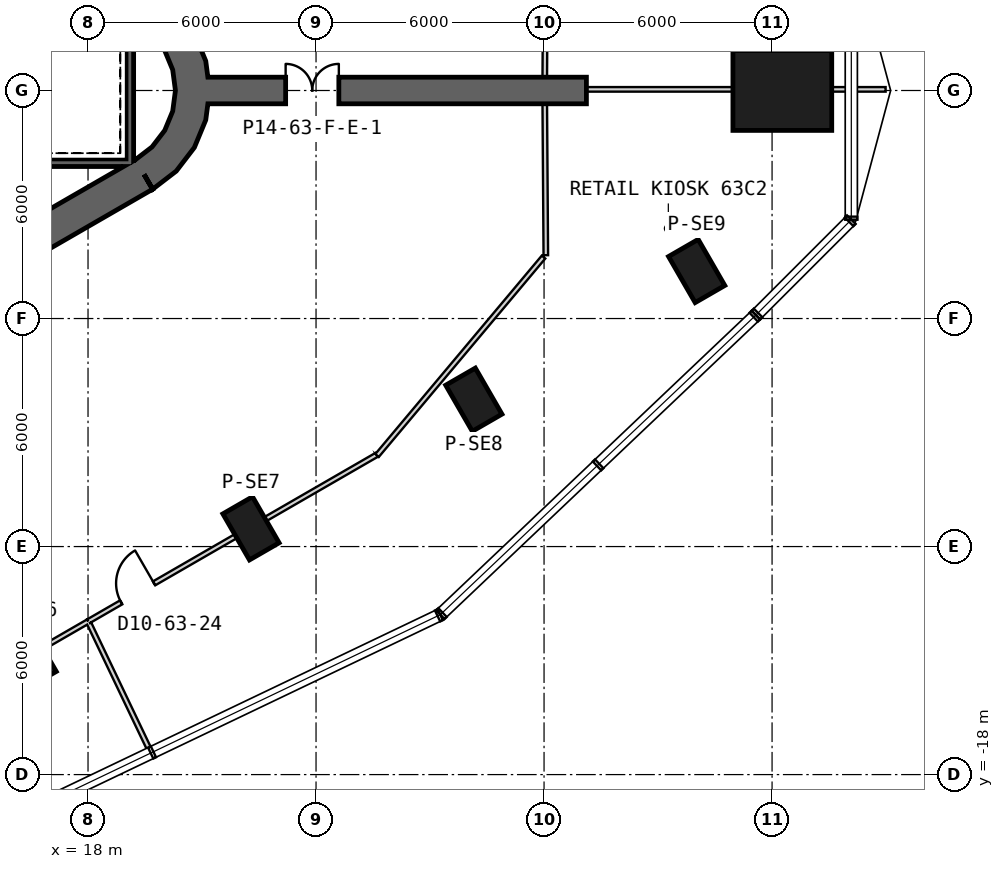
"""IFC4 building model, lengths in metres.
Left out: names, types, materials, properties, quantities, classifications, styles, units other than length and angle.
Written with IfcOpenShell. Run it as: python <this file> out.ifc"""

import sys

from ifc_helpers import new_model, si_unit, direction, frame, frame_2d, origin, origin_2d, place, context, subcontext, project, spatial, polyline, rectangle, outline, extrude, element, fill, save


model = new_model("IFC4")
c1 = context("Model", 3, precision=1e-05, world=origin(), true_north=direction((0.0, 1.0)))
c2 = subcontext(c1, "Body", "Model", "MODEL_VIEW")
j1 = project(units=[si_unit("LENGTHUNIT", "METRE"), si_unit("PLANEANGLEUNIT", "RADIAN")], contexts=[c1])
p1 = place(None, origin())
s1 = spatial("IfcSite", under=j1, at=p1, CompositionType="ELEMENT")
p2 = place(p1, origin())
s2 = spatial("IfcBuilding", under=s1, at=p2, CompositionType="ELEMENT")
p3 = place(p2, frame((0.0, 0.0, 277.2)))
s3 = spatial("IfcBuildingStorey", under=s2, at=p3, CompositionType="ELEMENT", Elevation=277.2)
p4 = place(p3, frame((36.27, 0.0, 0.0), z_axis=(0.0, 0.0, 1.0), x_axis=(1.0, 0.0, 0.0)))
e1 = element("IfcColumn", 1, at=p4, inside=s3, PredefinedType="COLUMN", context=c2, shape_type="SweptSolid", body=[
    extrude(rectangle(XDim=2.6, YDim=2.1, at=origin_2d()), origin(), (0.0, 0.0, 1.0), 6.5),
])
for number, where, z_axis, x_axis in (
    (2, (16.425, -14.906, 0.0), (0.0, 0.0, 1.0), (0.5, -0.866, 0.0)),
    (3, (22.288, -11.521, 0.0), (0.0, 0.0, 1.0), (0.5, -0.866, 0.0)),
    (4, (28.152, -8.135, 0.0), (0.0, 0.0, 1.0), (0.5, -0.866, 0.0)),
    (5, (34.016, -4.75, 0.0), (0.0, 0.0, 1.0), (0.5, -0.866, 0.0)),
):
    element("IfcColumn", number, at=place(p3, frame(where, z_axis=z_axis, x_axis=x_axis)), inside=s3, PredefinedType="COLUMN", context=c2, shape_type="SweptSolid", body=[
        extrude(rectangle(XDim=1.4, YDim=0.9, at=origin_2d()), origin(), (0.0, 0.0, 1.0), 6.5),
    ])
p5 = place(p3, frame((-7.825, -17.97, 0.0), z_axis=(0.0, 0.0, 1.0), x_axis=(0.866028369851, 0.499994862586, 0.0)))
e6 = element("IfcWall", 6, at=p5, inside=s3, PredefinedType="SHEAR", context=c2, shape_type="SweptSolid", body=[
    extrude(rectangle(XDim=31.523, YDim=0.9, at=frame_2d((15.762, 0.0))), origin(), (0.0, 0.0, 1.0), 6.5),
])
p6 = place(p5, frame((7.062, 0.0, 0.0)))
e7 = element("IfcOpeningElement", 7, at=p6, cuts=e6, PredefinedType="OPENING", context=c2, shape_type="SweptSolid", body=[
    extrude(rectangle(XDim=1.2, YDim=2.4, at=frame_2d((0.6, 1.2))), frame((0.0, 0.46, 0.0), z_axis=(0.0, -1.0, 0.0), x_axis=(1.0, 0.0, 0.0)), (0.0, 0.0, 1.0), 0.92),
])
p7 = place(p5, frame((9.762, 0.0, 0.0)))
e8 = element("IfcOpeningElement", 8, at=p7, cuts=e6, PredefinedType="OPENING", context=c2, shape_type="SweptSolid", body=[
    extrude(rectangle(XDim=1.2, YDim=2.4, at=frame_2d((0.6, 1.2))), frame((0.0, 0.46, 0.0), z_axis=(0.0, -1.0, 0.0), x_axis=(1.0, 0.0, 0.0)), (0.0, 0.0, 1.0), 0.92),
])
p8 = place(p5, frame((12.462, 0.0, 0.0)))
e9 = element("IfcOpeningElement", 9, at=p8, cuts=e6, PredefinedType="OPENING", context=c2, shape_type="SweptSolid", body=[
    extrude(rectangle(XDim=1.2, YDim=2.4, at=frame_2d((0.6, 1.2))), frame((0.0, 0.46, 0.0), z_axis=(0.0, -1.0, 0.0), x_axis=(1.0, 0.0, 0.0)), (0.0, 0.0, 1.0), 0.92),
])
p9 = place(p5, frame((15.162, 0.0, 0.0)))
e10 = element("IfcOpeningElement", 10, at=p9, cuts=e6, PredefinedType="OPENING", context=c2, shape_type="SweptSolid", body=[
    extrude(rectangle(XDim=1.2, YDim=2.4, at=frame_2d((0.6, 1.2))), frame((0.0, 0.46, 0.0), z_axis=(0.0, -1.0, 0.0), x_axis=(1.0, 0.0, 0.0)), (0.0, 0.0, 1.0), 0.92),
])
p10 = place(p5, frame((17.862, 0.0, 0.0)))
e11 = element("IfcOpeningElement", 11, at=p10, cuts=e6, PredefinedType="OPENING", context=c2, shape_type="SweptSolid", body=[
    extrude(rectangle(XDim=1.2, YDim=2.4, at=frame_2d((0.6, 1.2))), frame((0.0, 0.46, 0.0), z_axis=(0.0, -1.0, 0.0), x_axis=(1.0, 0.0, 0.0)), (0.0, 0.0, 1.0), 0.92),
])
p11 = place(p5, frame((20.562, 0.0, 0.0)))
e12 = element("IfcOpeningElement", 12, at=p11, cuts=e6, PredefinedType="OPENING", context=c2, shape_type="SweptSolid", body=[
    extrude(rectangle(XDim=1.2, YDim=2.4, at=frame_2d((0.6, 1.2))), frame((0.0, 0.46, 0.0), z_axis=(0.0, -1.0, 0.0), x_axis=(1.0, 0.0, 0.0)), (0.0, 0.0, 1.0), 0.92),
])
p12 = place(p5, frame((26.712, 0.0, 0.0)))
e13 = element("IfcOpeningElement", 13, at=p12, cuts=e6, PredefinedType="OPENING", context=c2, shape_type="SweptSolid", body=[
    extrude(rectangle(XDim=1.2, YDim=2.4, at=frame_2d((0.6, 1.2))), frame((0.0, 0.46, 0.0), z_axis=(0.0, -1.0, 0.0), x_axis=(1.0, 0.0, 0.0)), (0.0, 0.0, 1.0), 0.92),
])
p13 = place(p5, frame((3.612, 0.0, 0.0)))
e14 = element("IfcOpeningElement", 14, at=p13, cuts=e6, PredefinedType="OPENING", context=c2, shape_type="SweptSolid", body=[
    extrude(rectangle(XDim=1.2, YDim=2.4, at=frame_2d((0.6, 1.2))), frame((0.0, 0.46, 0.0), z_axis=(0.0, -1.0, 0.0), x_axis=(1.0, 0.0, 0.0)), (0.0, 0.0, 1.0), 0.92),
])
p14 = place(p3, origin())
e15 = element("IfcWall", 15, at=p14, inside=s3, PredefinedType="SHEAR", context=c2, shape_type="SweptSolid", body=[
    extrude(outline(polyline([(19.7, -2.598), (20.321, -2.121), (20.798, -1.5), (21.098, -0.777), (21.2, 0.0), (21.098, 0.777), (20.798, 1.5), (20.321, 2.121), (19.7, 2.598), (19.25, 1.819), (19.685, 1.485), (20.019, 1.05), (20.229, 0.543), (20.3, 0.0), (20.229, -0.543), (20.019, -1.05), (19.685, -1.485), (19.25, -1.819), (19.7, -2.598)])), origin(), (0.0, 0.0, 1.0), 6.5),
])
p15 = place(p3, frame((21.15, 0.0, 0.0), z_axis=(0.0, 0.0, 1.0), x_axis=(1.0, 0.0, 0.0)))
e16 = element("IfcWall", 16, at=p15, inside=s3, PredefinedType="SHEAR", context=c2, shape_type="SweptSolid", body=[
    extrude(rectangle(XDim=9.965, YDim=0.7, at=frame_2d((4.982, 0.0))), origin(), (0.0, 0.0, 1.0), 6.5),
])
p16 = place(p15, frame((2.05, 0.0, 0.0)))
e17 = element("IfcOpeningElement", 17, at=p16, cuts=e16, PredefinedType="OPENING", context=c2, shape_type="SweptSolid", body=[
    extrude(rectangle(XDim=1.4, YDim=2.4, at=frame_2d((0.7, 1.2))), frame((0.0, 0.36, 0.0), z_axis=(0.0, -1.0, 0.0), x_axis=(1.0, 0.0, 0.0)), (0.0, 0.0, 1.0), 0.72),
])
p17 = place(p3, frame((19.1, -2.0, -0.35), z_axis=(0.0, 0.0, 1.0), x_axis=(0.0, 1.0, 0.0)))
e18 = element("IfcWall", 18, at=p17, inside=s3, PredefinedType="SHEAR", context=c2, shape_type="SweptSolid", body=[
    extrude(rectangle(XDim=3.8, YDim=0.2, at=frame_2d((1.9, 0.0))), origin(), (0.0, 0.0, 1.0), 6.45),
])
p18 = place(p3, frame((11.1, -1.9, -0.35), z_axis=(0.0, 0.0, 1.0), x_axis=(1.0, 0.0, 0.0)))
e19 = element("IfcWall", 19, at=p18, inside=s3, PredefinedType="SHEAR", context=c2, shape_type="SweptSolid", body=[
    extrude(rectangle(XDim=7.9, YDim=0.2, at=frame_2d((3.95, 0.0))), origin(), (0.0, 0.0, 1.0), 6.45),
])
p19 = place(p3, frame((30.019, 0.35, 0.0), z_axis=(0.0, 0.0, 1.0), x_axis=(0.00700430852, 0.99997546953, 0.0)))
e20 = element("IfcWall", 20, at=p19, inside=s3, PredefinedType="PARTITIONING", context=c2, shape_type="SweptSolid", body=[
    extrude(rectangle(XDim=3.869, YDim=0.12, at=frame_2d((1.935, 0.0))), origin(), (0.0, 0.0, 1.0), 5.28),
])
p20 = place(p3, frame((31.115, 0.03, 0.0), z_axis=(0.0, 0.0, 1.0), x_axis=(1.0, 0.0, 0.0)))
e21 = element("IfcWall", 21, at=p20, inside=s3, PredefinedType="PARTITIONING", context=c2, shape_type="SweptSolid", body=[
    extrude(rectangle(XDim=3.856, YDim=0.12, at=frame_2d((1.928, 0.0))), origin(), (0.0, 0.0, 1.0), 5.67),
])
p21 = place(p3, frame((37.57, 0.03, 0.0), z_axis=(0.0, 0.0, 1.0), x_axis=(1.0, 0.0, 0.0)))
e22 = element("IfcWall", 22, at=p21, inside=s3, PredefinedType="PARTITIONING", context=c2, shape_type="SweptSolid", body=[
    extrude(rectangle(XDim=1.418, YDim=0.12, at=frame_2d((0.709, 0.0))), origin(), (0.0, 0.0, 1.0), 6.1),
])
p22 = place(p3, frame((-4.595, -27.017, 0.0), z_axis=(0.0, 0.0, 1.0), x_axis=(0.866023879948, 0.500002639353, 0.0)))
e23 = element("IfcWall", 23, at=p22, inside=s3, PredefinedType="PARTITIONING", context=c2, shape_type="SweptSolid", body=[
    extrude(rectangle(XDim=26.097, YDim=0.12, at=frame_2d((13.049, 0.0))), origin(), (0.0, 0.0, 1.0), 6.1),
])
p23 = place(p22, frame((19.96, 0.0, 0.0)))
e24 = element("IfcOpeningElement", 24, at=p23, cuts=e23, PredefinedType="OPENING", context=c2, shape_type="SweptSolid", body=[
    extrude(rectangle(XDim=1.8, YDim=2.1, at=frame_2d((0.9, 1.05))), frame((0.0, 0.07, 0.0), z_axis=(0.0, -1.0, 0.0), x_axis=(1.0, 0.0, 0.0)), (0.0, 0.0, 1.0), 0.14),
])
p24 = place(p3, frame((18.006, -13.968, 0.0), z_axis=(0.0, 0.0, 1.0), x_axis=(0.866026830048, 0.499997529631, 0.0)))
e25 = element("IfcWall", 25, at=p24, inside=s3, PredefinedType="PARTITIONING", context=c2, shape_type="SweptSolid", body=[
    extrude(rectangle(XDim=8.758, YDim=0.12, at=frame_2d((4.379, 0.0))), origin(), (0.0, 0.0, 1.0), 6.1),
])
p25 = place(p24, frame((1.0, 0.0, 0.0)))
e26 = element("IfcOpeningElement", 26, at=p25, cuts=e25, PredefinedType="OPENING", context=c2, shape_type="SweptSolid", body=[
    extrude(rectangle(XDim=1.0, YDim=2.1, at=frame_2d((0.5, 1.05))), frame((0.0, 0.07, 0.0), z_axis=(0.0, -1.0, 0.0), x_axis=(1.0, 0.0, 0.0)), (0.0, 0.0, 1.0), 0.14),
])
p26 = place(p3, frame((30.046, -4.334, 0.0), z_axis=(0.0, 0.0, 1.0), x_axis=(-0.006986407906, 0.999975594754, 0.0)))
e27 = element("IfcWall", 27, at=p26, inside=s3, PredefinedType="PARTITIONING", context=c2, shape_type="SweptSolid", body=[
    extrude(rectangle(XDim=3.984, YDim=0.12, at=frame_2d((1.992, 0.0))), origin(), (0.0, 0.0, 1.0), 5.28),
])
p27 = place(p3, frame((25.604, -9.605, 0.0), z_axis=(0.0, 0.0, 1.0), x_axis=(0.642787203901, 0.766044783613, 0.0)))
e28 = element("IfcWall", 28, at=p27, inside=s3, PredefinedType="PARTITIONING", context=c2, shape_type="SweptSolid", body=[
    extrude(rectangle(XDim=6.818, YDim=0.12, at=frame_2d((3.409, 0.0))), origin(), (0.0, 0.0, 1.0), 5.38),
])
p28 = place(p3, frame((19.658, -17.43, 0.0), z_axis=(0.0, 0.0, 1.0), x_axis=(-0.431155702596, 0.902277540516, 0.0)))
e29 = element("IfcWall", 29, at=p28, inside=s3, PredefinedType="PARTITIONING", context=c2, shape_type="SweptSolid", body=[
    extrude(rectangle(XDim=3.775, YDim=0.12, at=frame_2d((1.888, 0.0))), origin(), (0.0, 0.0, 1.0), 6.1),
])
p29 = place(p25, origin())
e30 = element("IfcDoor", 30, at=p29, inside=s3, OperationType="SINGLE_SWING_RIGHT", PredefinedType="NOTDEFINED", context=c2, shape_type="SweptSolid", body=[
    extrude(rectangle(XDim=1.0, YDim=2.1, at=frame_2d((0.5, 1.05))), frame((0.0, 0.025, 0.0), z_axis=(0.0, -1.0, 0.0), x_axis=(1.0, 0.0, 0.0)), (0.0, 0.0, 1.0), 0.05),
])
fill(e26, e30)
p30 = place(p16, origin())
e31 = element("IfcDoor", 31, at=p30, inside=s3, OperationType="DOUBLE_DOOR_SINGLE_SWING", PredefinedType="NOTDEFINED", context=c2, shape_type="SweptSolid", body=[
    extrude(rectangle(XDim=1.4, YDim=2.4, at=frame_2d((0.7, 1.2))), frame((0.0, 0.025, 0.0), z_axis=(0.0, -1.0, 0.0), x_axis=(1.0, 0.0, 0.0)), (0.0, 0.0, 1.0), 0.05),
])
fill(e17, e31)
save(model, sys.argv[1])
